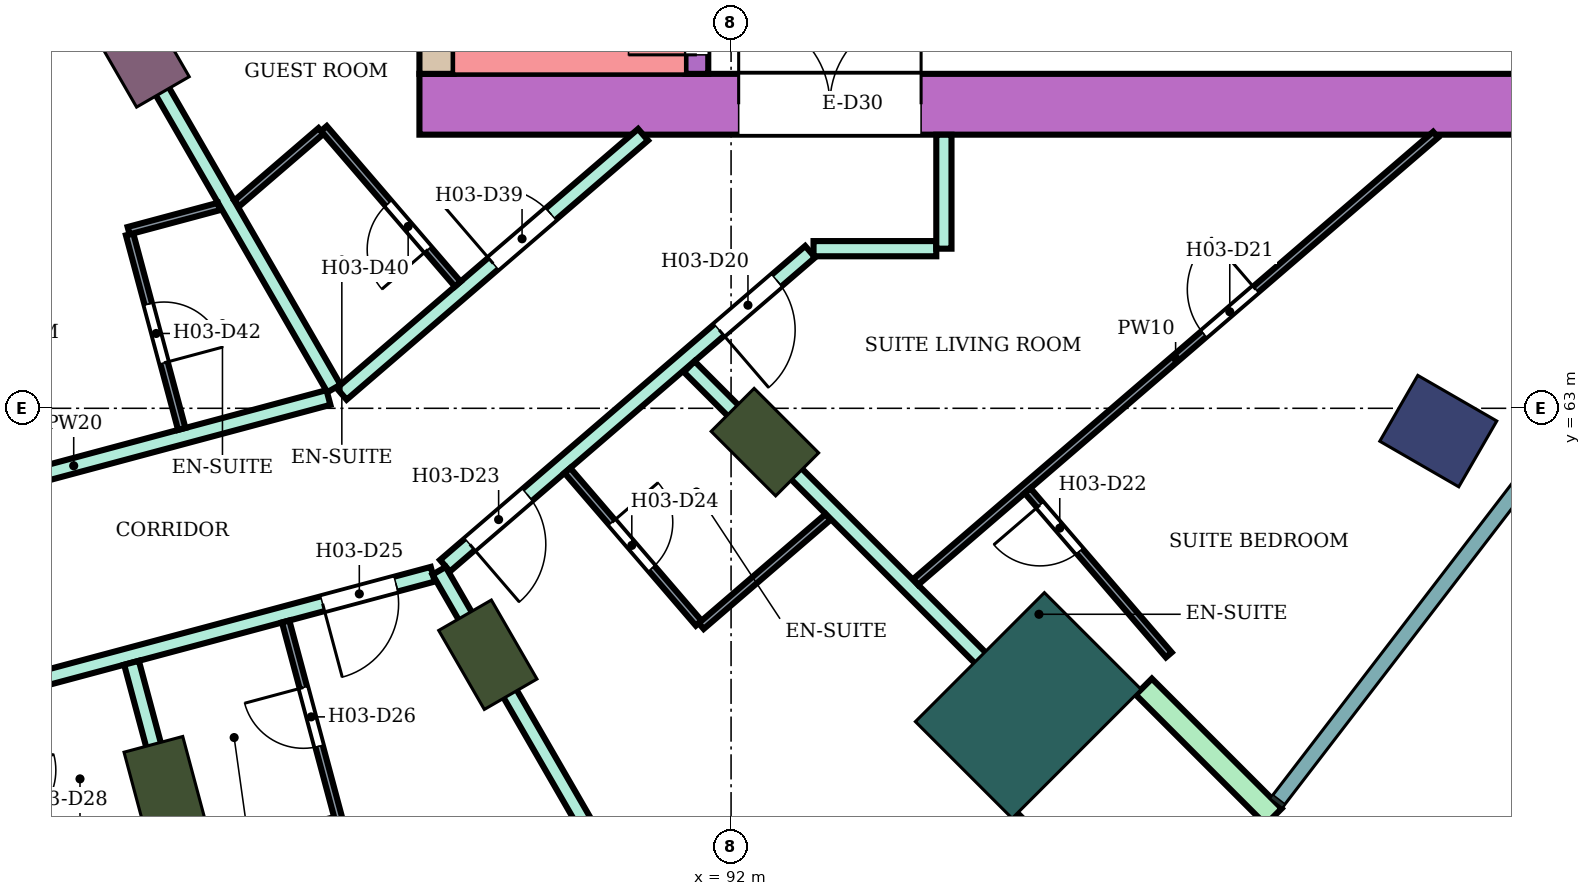
"""IFC4 building model, lengths in metres.
Left out: names, types, materials, properties, quantities, classifications, styles, units other than length and angle.
Written with IfcOpenShell. Run it as: python <this file> out.ifc"""

import sys

from ifc_helpers import new_model, si_unit, direction, frame, frame_2d, origin, origin_2d, place, context, subcontext, project, spatial, rectangle, extrude, element, fill, save


model = new_model("IFC4")
c1 = context("Model", 3, precision=1e-05, world=origin(), true_north=direction((0.0, 1.0)))
c2 = subcontext(c1, "Body", "Model", "MODEL_VIEW")
j1 = project(units=[si_unit("LENGTHUNIT", "METRE"), si_unit("PLANEANGLEUNIT", "RADIAN")], contexts=[c1])
p1 = place(None, origin())
s1 = spatial("IfcSite", under=j1, at=p1, CompositionType="ELEMENT")
p2 = place(p1, origin())
s2 = spatial("IfcBuilding", under=s1, at=p2, CompositionType="ELEMENT")
p3 = place(p2, frame((0.0, 0.0, 55.4)))
s3 = spatial("IfcBuildingStorey", under=s2, at=p3, CompositionType="ELEMENT", Elevation=55.4)
p4 = place(p3, frame((101.304, 62.7, 0.0), z_axis=(0.0, 0.0, 1.0), x_axis=(0.866025403784, -0.5, 0.0)))
e1 = element("IfcColumn", 1, at=p4, inside=s3, PredefinedType="COLUMN", context=c2, shape_type="SweptSolid", body=[
    extrude(rectangle(XDim=1.2, YDim=1.0, at=origin_2d()), origin(), (0.0, 0.0, 1.0), 3.8),
])
for number, where, z_axis, x_axis in (
    (2, (84.555, 58.0, 0.0), (0.0, 0.0, 1.0), (0.259, -0.966, 0.0)),
    (3, (88.8, 59.758, 0.0), (0.0, 0.0, 1.0), (0.5, -0.866, 0.0)),
    (4, (92.445, 62.555, 0.0), (0.0, 0.0, 1.0), (0.707, -0.707, 0.0)),
):
    element("IfcColumn", number, at=place(p3, frame(where, z_axis=z_axis, x_axis=x_axis)), inside=s3, PredefinedType="COLUMN", context=c2, shape_type="SweptSolid", body=[
        extrude(rectangle(XDim=1.2, YDim=0.8, at=origin_2d()), origin(), (0.0, 0.0, 1.0), 3.8),
    ])
p5 = place(p3, frame((84.3, 67.552, 0.0), z_axis=(0.0, 0.0, 1.0), x_axis=(0.5, -0.866025403784, 0.0)))
e5 = element("IfcColumn", 5, at=p5, inside=s3, PredefinedType="COLUMN", context=c2, shape_type="SweptSolid", body=[
    extrude(rectangle(XDim=0.9, YDim=0.8, at=origin_2d()), origin(), (0.0, 0.0, 1.0), 3.8),
])
p6 = place(p3, frame((95.91, 59.09, 0.0), z_axis=(0.0, 0.0, 1.0), x_axis=(0.707106781187, -0.707106781187, 0.0)))
e6 = element("IfcColumn", 6, at=p6, inside=s3, PredefinedType="COLUMN", context=c2, shape_type="SweptSolid", body=[
    extrude(rectangle(XDim=1.8, YDim=2.4, at=origin_2d()), origin(), (0.0, 0.0, 1.0), 3.8),
])
p7 = place(p3, frame((87.9, 67.0, 0.0), z_axis=(0.0, 0.0, 1.0), x_axis=(1.0, 0.0, 0.0)))
e7 = element("IfcWall", 7, at=p7, inside=s3, PredefinedType="SHEAR", context=c2, shape_type="SweptSolid", body=[
    extrude(rectangle(XDim=14.7, YDim=0.8, at=frame_2d((7.35, 0.0))), origin(), (0.0, 0.0, 1.0), 3.48),
])
p8 = place(p7, frame((4.2, 0.0, 0.0)))
e8 = element("IfcOpeningElement", 8, at=p8, cuts=e7, PredefinedType="OPENING", context=c2, shape_type="SweptSolid", body=[
    extrude(rectangle(XDim=2.4, YDim=2.4, at=frame_2d((1.2, 1.2))), frame((0.0, 0.41, 0.0), z_axis=(0.0, -1.0, 0.0), x_axis=(1.0, 0.0, 0.0)), (0.0, 0.0, 1.0), 0.82),
])
p9 = place(p3, frame((88.125, 67.4, 0.0), z_axis=(0.0, 0.0, 1.0), x_axis=(0.0, 1.0, 0.0)))
e9 = element("IfcWall", 9, at=p9, inside=s3, PredefinedType="SHEAR", context=c2, shape_type="SweptSolid", body=[
    extrude(rectangle(XDim=7.6, YDim=0.45, at=frame_2d((3.8, 0.0))), origin(), (0.0, 0.0, 1.0), 3.48),
])
p10 = place(p3, frame((91.55, 67.4, 0.0), z_axis=(0.0, 0.0, 1.0), x_axis=(0.0, 1.0, 0.0)))
e10 = element("IfcWall", 10, at=p10, inside=s3, PredefinedType="SHEAR", context=c2, shape_type="SweptSolid", body=[
    extrude(rectangle(XDim=7.6, YDim=0.3, at=frame_2d((3.8, 0.0))), origin(), (0.0, 0.0, 1.0), 3.48),
])
p11 = place(p10, frame((0.25, 0.0, 0.0)))
e11 = element("IfcOpeningElement", 11, at=p11, cuts=e10, PredefinedType="OPENING", context=c2, shape_type="SweptSolid", body=[
    extrude(rectangle(XDim=0.9, YDim=2.1, at=frame_2d((0.45, 1.05))), frame((0.0, 0.16, 0.0), z_axis=(0.0, -1.0, 0.0), x_axis=(1.0, 0.0, 0.0)), (0.0, 0.0, 1.0), 0.32),
])
for number, where, z_axis, x_axis in (
    (12, (95.662, 57.57, 0.0), (0.0, 0.0, 1.0), (0.707, -0.707, 0.0)),
    (13, (97.43, 59.338, 0.0), (0.0, 0.0, 1.0), (0.707, -0.707, 0.0)),
):
    element("IfcWall", number, at=place(p3, frame(where, z_axis=z_axis, x_axis=x_axis)), inside=s3, PredefinedType="NOTDEFINED", context=c2, shape_type="SweptSolid", body=[
        extrude(rectangle(XDim=2.416, YDim=0.3, at=frame_2d((1.208, 0.0))), origin(), (0.0, 0.0, 1.0), 3.8),
    ])
p12 = place(p3, frame((80.0, 67.396, 0.0), z_axis=(0.0, 0.0, 1.0), x_axis=(0.965933654434, 0.258789828301, 0.0)))
e14 = element("IfcWall", 14, at=p12, inside=s3, PredefinedType="NOTDEFINED", context=c2, shape_type="SweptSolid", body=[
    extrude(rectangle(XDim=3.936, YDim=0.2, at=frame_2d((1.968, 0.0))), origin(), (0.0, 0.0, 1.0), 3.8),
])
p13 = place(p12, frame((0.468, 0.0, 0.9)))
e15 = element("IfcOpeningElement", 15, at=p13, cuts=e14, PredefinedType="OPENING", context=c2, shape_type="SweptSolid", body=[
    extrude(rectangle(XDim=3.0, YDim=2.3, at=frame_2d((1.5, 1.15))), frame((0.0, 0.11, 0.0), z_axis=(0.0, -1.0, 0.0), x_axis=(1.0, 0.0, 0.0)), (0.0, 0.0, 1.0), 0.22),
])
p14 = place(p3, frame((80.0, 58.655, 0.0), z_axis=(0.0, 0.0, 1.0), x_axis=(0.965974635626, 0.258636817424, 0.0)))
e16 = element("IfcWall", 16, at=p14, inside=s3, PredefinedType="PARTITIONING", context=c2, shape_type="SweptSolid", body=[
    extrude(rectangle(XDim=8.36, YDim=0.2, at=frame_2d((4.18, 0.0))), origin(), (0.0, 0.0, 1.0), 3.35),
])
p15 = place(p14, frame((6.86, 0.0, 0.0)))
e17 = element("IfcOpeningElement", 17, at=p15, cuts=e16, PredefinedType="OPENING", context=c2, shape_type="SweptSolid", body=[
    extrude(rectangle(XDim=1.0, YDim=2.1, at=frame_2d((0.5, 1.05))), frame((0.0, 0.11, 0.0), z_axis=(0.0, -1.0, 0.0), x_axis=(1.0, 0.0, 0.0)), (0.0, 0.0, 1.0), 0.22),
])
p16 = place(p14, frame((0.55, 0.0, 0.0)))
e18 = element("IfcOpeningElement", 18, at=p16, cuts=e16, PredefinedType="OPENING", context=c2, shape_type="SweptSolid", body=[
    extrude(rectangle(XDim=1.0, YDim=2.1, at=frame_2d((0.5, 1.05))), frame((0.0, 0.11, 0.0), z_axis=(0.0, -1.0, 0.0), x_axis=(1.0, 0.0, 0.0)), (0.0, 0.0, 1.0), 0.22),
])
p17 = place(p3, frame((80.0, 61.346, 0.0), z_axis=(0.0, 0.0, 1.0), x_axis=(0.965924181808, 0.258825182312, 0.0)))
e19 = element("IfcWall", 19, at=p17, inside=s3, PredefinedType="PARTITIONING", context=c2, shape_type="SweptSolid", body=[
    extrude(rectangle(XDim=6.94, YDim=0.2, at=frame_2d((3.47, 0.0))), origin(), (0.0, 0.0, 1.0), 3.35),
])
p18 = place(p17, frame((0.55, 0.0, 0.0)))
e20 = element("IfcOpeningElement", 20, at=p18, cuts=e19, PredefinedType="OPENING", context=c2, shape_type="SweptSolid", body=[
    extrude(rectangle(XDim=1.0, YDim=2.1, at=frame_2d((0.5, 1.05))), frame((0.0, 0.11, 0.0), z_axis=(0.0, -1.0, 0.0), x_axis=(1.0, 0.0, 0.0)), (0.0, 0.0, 1.0), 0.22),
])
p19 = place(p3, frame((83.848, 68.332, 0.0), z_axis=(0.0, 0.0, 1.0), x_axis=(0.499901724708, -0.866082135617, 0.0)))
e21 = element("IfcWall", 21, at=p19, inside=s3, PredefinedType="PARTITIONING", context=c2, shape_type="SweptSolid", body=[
    extrude(rectangle(XDim=5.855, YDim=0.2, at=frame_2d((2.928, 0.0))), origin(), (0.0, 0.0, 1.0), 3.35),
])
p20 = place(p3, frame((84.112, 59.652, 0.0), z_axis=(0.0, 0.0, 1.0), x_axis=(0.258843225553, -0.965919346832, 0.0)))
e22 = element("IfcWall", 22, at=p20, inside=s3, PredefinedType="PARTITIONING", context=c2, shape_type="SweptSolid", body=[
    extrude(rectangle(XDim=9.909, YDim=0.2, at=frame_2d((4.955, 0.0))), origin(), (0.0, 0.0, 1.0), 3.35),
])
p21 = place(p3, frame((86.877, 63.189, 0.0), z_axis=(0.0, 0.0, 1.0), x_axis=(0.758164888471, 0.652062881853, 0.0)))
e23 = element("IfcWall", 23, at=p21, inside=s3, PredefinedType="PARTITIONING", context=c2, shape_type="SweptSolid", body=[
    extrude(rectangle(XDim=5.23, YDim=0.2, at=frame_2d((2.615, 0.0))), origin(), (0.0, 0.0, 1.0), 3.35),
])
p22 = place(p21, frame((2.63, 0.0, 0.0)))
e24 = element("IfcOpeningElement", 24, at=p22, cuts=e23, PredefinedType="OPENING", context=c2, shape_type="SweptSolid", body=[
    extrude(rectangle(XDim=1.0, YDim=2.1, at=frame_2d((0.5, 1.05))), frame((0.0, 0.11, 0.0), z_axis=(0.0, -1.0, 0.0), x_axis=(1.0, 0.0, 0.0)), (0.0, 0.0, 1.0), 0.22),
])
p23 = place(p3, frame((88.236, 60.929, 0.0), z_axis=(0.0, 0.0, 1.0), x_axis=(0.758227485202, 0.651990092474, 0.0)))
e25 = element("IfcWall", 25, at=p23, inside=s3, PredefinedType="PARTITIONING", context=c2, shape_type="SweptSolid", body=[
    extrude(rectangle(XDim=6.336, YDim=0.2, at=frame_2d((3.168, 0.0))), origin(), (0.0, 0.0, 1.0), 3.35),
])
p24 = place(p23, frame((4.757, 0.0, 0.0)))
e26 = element("IfcOpeningElement", 26, at=p24, cuts=e25, PredefinedType="OPENING", context=c2, shape_type="SweptSolid", body=[
    extrude(rectangle(XDim=1.0, YDim=2.1, at=frame_2d((0.5, 1.05))), frame((0.0, 0.11, 0.0), z_axis=(0.0, -1.0, 0.0), x_axis=(1.0, 0.0, 0.0)), (0.0, 0.0, 1.0), 0.22),
])
p25 = place(p23, frame((0.43, 0.0, 0.0)))
e27 = element("IfcOpeningElement", 27, at=p25, cuts=e25, PredefinedType="OPENING", context=c2, shape_type="SweptSolid", body=[
    extrude(rectangle(XDim=1.0, YDim=2.1, at=frame_2d((0.5, 1.05))), frame((0.0, 0.11, 0.0), z_axis=(0.0, -1.0, 0.0), x_axis=(1.0, 0.0, 0.0)), (0.0, 0.0, 1.0), 0.22),
])
p26 = place(p3, frame((88.159, 60.863, 0.0), z_axis=(0.0, 0.0, 1.0), x_axis=(0.499886028459, -0.866091195286, 0.0)))
e28 = element("IfcWall", 28, at=p26, inside=s3, PredefinedType="PARTITIONING", context=c2, shape_type="SweptSolid", body=[
    extrude(rectangle(XDim=9.475, YDim=0.2, at=frame_2d((4.737, 0.0))), origin(), (0.0, 0.0, 1.0), 3.35),
])
p27 = place(p3, frame((91.449, 63.548, 0.0), z_axis=(0.0, 0.0, 1.0), x_axis=(0.706984810649, -0.707228730688, 0.0)))
e29 = element("IfcWall", 29, at=p27, inside=s3, PredefinedType="PARTITIONING", context=c2, shape_type="SweptSolid", body=[
    extrude(rectangle(XDim=7.006, YDim=0.2, at=frame_2d((3.503, 0.0))), origin(), (0.0, 0.0, 1.0), 3.35),
])
p28 = place(p3, frame((93.085, 65.1, 0.0), z_axis=(0.0, 0.0, 1.0), x_axis=(1.0, 0.0, 0.0)))
e30 = element("IfcWall", 30, at=p28, inside=s3, PredefinedType="PARTITIONING", context=c2, shape_type="SweptSolid", body=[
    extrude(rectangle(XDim=1.615, YDim=0.2, at=frame_2d((0.808, 0.0))), origin(), (0.0, 0.0, 1.0), 3.35),
])
p29 = place(p3, frame((94.8, 65.1, 0.0), z_axis=(0.0, 0.0, 1.0), x_axis=(0.0, 1.0, 0.0)))
e31 = element("IfcWall", 31, at=p29, inside=s3, PredefinedType="PARTITIONING", context=c2, shape_type="SweptSolid", body=[
    extrude(rectangle(XDim=1.499, YDim=0.2, at=frame_2d((0.75, 0.0))), origin(), (0.0, 0.0, 1.0), 3.35),
])
p30 = place(p3, frame((84.087, 65.289, 0.0), z_axis=(0.0, 0.0, 1.0), x_axis=(0.258929459649, -0.965896234037, 0.0)))
e32 = element("IfcWall", 32, at=p30, inside=s3, PredefinedType="PARTITIONING", context=c2, shape_type="SweptSolid", body=[
    extrude(rectangle(XDim=2.65, YDim=0.1, at=frame_2d((1.325, 0.0))), origin(), (0.0, 0.0, 1.0), 3.35),
])
p31 = place(p30, frame((0.95, 0.0, 0.0)))
e33 = element("IfcOpeningElement", 33, at=p31, cuts=e32, PredefinedType="OPENING", context=c2, shape_type="SweptSolid", body=[
    extrude(rectangle(XDim=0.8, YDim=2.1, at=frame_2d((0.4, 1.05))), frame((0.0, 0.06, 0.0), z_axis=(0.0, -1.0, 0.0), x_axis=(1.0, 0.0, 0.0)), (0.0, 0.0, 1.0), 0.12),
])
p32 = place(p3, frame((84.074, 65.337, 0.0), z_axis=(0.0, 0.0, 1.0), x_axis=(0.965914351064, 0.258861867428, 0.0)))
e34 = element("IfcWall", 34, at=p32, inside=s3, PredefinedType="PARTITIONING", context=c2, shape_type="SweptSolid", body=[
    extrude(rectangle(XDim=1.229, YDim=0.1, at=frame_2d((0.615, 0.0))), origin(), (0.0, 0.0, 1.0), 3.35),
])
p33 = place(p3, frame((85.497, 65.696, 0.0), z_axis=(0.0, 0.0, 1.0), x_axis=(0.75817032582, 0.652056559698, 0.0)))
e35 = element("IfcWall", 35, at=p33, inside=s3, PredefinedType="PARTITIONING", context=c2, shape_type="SweptSolid", body=[
    extrude(rectangle(XDim=1.461, YDim=0.1, at=frame_2d((0.73, 0.0))), origin(), (0.0, 0.0, 1.0), 3.35),
])
p34 = place(p3, frame((86.14, 60.196, 0.0), z_axis=(0.0, 0.0, 1.0), x_axis=(0.258945475746, -0.965891940432, 0.0)))
e36 = element("IfcWall", 36, at=p34, inside=s3, PredefinedType="PARTITIONING", context=c2, shape_type="SweptSolid", body=[
    extrude(rectangle(XDim=2.7, YDim=0.1, at=frame_2d((1.35, 0.0))), origin(), (0.0, 0.0, 1.0), 3.35),
])
p35 = place(p34, frame((0.9, 0.0, 0.0)))
e37 = element("IfcOpeningElement", 37, at=p35, cuts=e36, PredefinedType="OPENING", context=c2, shape_type="SweptSolid", body=[
    extrude(rectangle(XDim=0.8, YDim=2.1, at=frame_2d((0.4, 1.05))), frame((0.0, 0.06, 0.0), z_axis=(0.0, -1.0, 0.0), x_axis=(1.0, 0.0, 0.0)), (0.0, 0.0, 1.0), 0.12),
])
p36 = place(p3, frame((86.643, 66.681, 0.0), z_axis=(0.0, 0.0, 1.0), x_axis=(0.652264876065, -0.757991115682, 0.0)))
e38 = element("IfcWall", 38, at=p36, inside=s3, PredefinedType="PARTITIONING", context=c2, shape_type="SweptSolid", body=[
    extrude(rectangle(XDim=2.699, YDim=0.1, at=frame_2d((1.35, 0.0))), origin(), (0.0, 0.0, 1.0), 3.35),
])
p37 = place(p36, frame((1.3, 0.0, 0.0)))
e39 = element("IfcOpeningElement", 39, at=p37, cuts=e38, PredefinedType="OPENING", context=c2, shape_type="SweptSolid", body=[
    extrude(rectangle(XDim=0.8, YDim=2.1, at=frame_2d((0.4, 1.05))), frame((0.0, 0.06, 0.0), z_axis=(0.0, -1.0, 0.0), x_axis=(1.0, 0.0, 0.0)), (0.0, 0.0, 1.0), 0.12),
])
p38 = place(p3, frame((89.846, 62.182, 0.0), z_axis=(0.0, 0.0, 1.0), x_axis=(0.652095405055, -0.758136915541, 0.0)))
e40 = element("IfcWall", 40, at=p38, inside=s3, PredefinedType="PARTITIONING", context=c2, shape_type="SweptSolid", body=[
    extrude(rectangle(XDim=2.65, YDim=0.1, at=frame_2d((1.325, 0.0))), origin(), (0.0, 0.0, 1.0), 3.35),
])
p39 = place(p38, frame((0.9, 0.0, 0.0)))
e41 = element("IfcOpeningElement", 41, at=p39, cuts=e40, PredefinedType="OPENING", context=c2, shape_type="SweptSolid", body=[
    extrude(rectangle(XDim=0.8, YDim=2.1, at=frame_2d((0.4, 1.05))), frame((0.0, 0.06, 0.0), z_axis=(0.0, -1.0, 0.0), x_axis=(1.0, 0.0, 0.0)), (0.0, 0.0, 1.0), 0.12),
])
p40 = place(p3, frame((91.607, 60.135, 0.0), z_axis=(0.0, 0.0, 1.0), x_axis=(0.758135842672, 0.652096652388, 0.0)))
e42 = element("IfcWall", 42, at=p40, inside=s3, PredefinedType="PARTITIONING", context=c2, shape_type="SweptSolid", body=[
    extrude(rectangle(XDim=2.201, YDim=0.1, at=frame_2d((1.101, 0.0))), origin(), (0.0, 0.0, 1.0), 3.35),
])
p41 = place(p3, frame((94.428, 60.715, 0.0), z_axis=(0.0, 0.0, 1.0), x_axis=(0.758117248367, 0.65211826974, 0.0)))
e43 = element("IfcWall", 43, at=p41, inside=s3, PredefinedType="PARTITIONING", context=c2, shape_type="SweptSolid", body=[
    extrude(rectangle(XDim=9.024, YDim=0.1, at=frame_2d((4.512, 0.0))), origin(), (0.0, 0.0, 1.0), 3.35),
])
p42 = place(p41, frame((5.002, 0.0, 0.0)))
e44 = element("IfcOpeningElement", 44, at=p42, cuts=e43, PredefinedType="OPENING", context=c2, shape_type="SweptSolid", body=[
    extrude(rectangle(XDim=0.9, YDim=2.1, at=frame_2d((0.45, 1.05))), frame((0.0, 0.06, 0.0), z_axis=(0.0, -1.0, 0.0), x_axis=(1.0, 0.0, 0.0)), (0.0, 0.0, 1.0), 0.12),
])
p43 = place(p3, frame((95.901, 61.916, 0.0), z_axis=(0.0, 0.0, 1.0), x_axis=(0.652215581117, -0.758033532074, 0.0)))
e45 = element("IfcWall", 45, at=p43, inside=s3, PredefinedType="PARTITIONING", context=c2, shape_type="SweptSolid", body=[
    extrude(rectangle(XDim=2.849, YDim=0.1, at=frame_2d((1.425, 0.0))), origin(), (0.0, 0.0, 1.0), 3.35),
])
p44 = place(p43, frame((0.25, 0.0, 0.0)))
e46 = element("IfcOpeningElement", 46, at=p44, cuts=e45, PredefinedType="OPENING", context=c2, shape_type="SweptSolid", body=[
    extrude(rectangle(XDim=0.8, YDim=2.1, at=frame_2d((0.4, 1.05))), frame((0.0, 0.06, 0.0), z_axis=(0.0, -1.0, 0.0), x_axis=(1.0, 0.0, 0.0)), (0.0, 0.0, 1.0), 0.12),
])
p45 = place(p13, origin())
e47 = element("IfcWindow", 47, at=p45, inside=s3, PartitioningType="SINGLE_PANEL", PredefinedType="WINDOW", context=c2, shape_type="SweptSolid", body=[
    extrude(rectangle(XDim=3.0, YDim=2.3, at=frame_2d((1.5, 1.15))), frame((0.0, 0.03, 0.0), z_axis=(0.0, -1.0, 0.0), x_axis=(1.0, 0.0, 0.0)), (0.0, 0.0, 1.0), 0.06),
])
fill(e15, e47)
p46 = place(p24, frame((1.0, 0.0, 0.0), z_axis=(0.0, 0.0, 1.0), x_axis=(-1.0, 0.0, 0.0)))
e48 = element("IfcDoor", 48, at=p46, inside=s3, OperationType="SINGLE_SWING_RIGHT", PredefinedType="DOOR", context=c2, shape_type="SweptSolid", body=[
    extrude(rectangle(XDim=1.0, YDim=2.1, at=frame_2d((0.5, 1.05))), frame((0.0, 0.025, 0.0), z_axis=(0.0, -1.0, 0.0), x_axis=(1.0, 0.0, 0.0)), (0.0, 0.0, 1.0), 0.05),
])
fill(e26, e48)
p47 = place(p42, origin())
e49 = element("IfcDoor", 49, at=p47, inside=s3, OperationType="SINGLE_SWING_RIGHT", PredefinedType="DOOR", context=c2, shape_type="SweptSolid", body=[
    extrude(rectangle(XDim=0.9, YDim=2.1, at=frame_2d((0.45, 1.05))), frame((0.0, 0.025, 0.0), z_axis=(0.0, -1.0, 0.0), x_axis=(1.0, 0.0, 0.0)), (0.0, 0.0, 1.0), 0.05),
])
fill(e44, e49)
p48 = place(p44, frame((0.8, 0.0, 0.0), z_axis=(0.0, 0.0, 1.0), x_axis=(-1.0, 0.0, 0.0)))
e50 = element("IfcDoor", 50, at=p48, inside=s3, OperationType="SINGLE_SWING_RIGHT", PredefinedType="DOOR", context=c2, shape_type="SweptSolid", body=[
    extrude(rectangle(XDim=0.8, YDim=2.1, at=frame_2d((0.4, 1.05))), frame((0.0, 0.025, 0.0), z_axis=(0.0, -1.0, 0.0), x_axis=(1.0, 0.0, 0.0)), (0.0, 0.0, 1.0), 0.05),
])
fill(e46, e50)
p49 = place(p25, frame((1.0, 0.0, 0.0), z_axis=(0.0, 0.0, 1.0), x_axis=(-1.0, 0.0, 0.0)))
e51 = element("IfcDoor", 51, at=p49, inside=s3, OperationType="SINGLE_SWING_RIGHT", PredefinedType="DOOR", context=c2, shape_type="SweptSolid", body=[
    extrude(rectangle(XDim=1.0, YDim=2.1, at=frame_2d((0.5, 1.05))), frame((0.0, 0.025, 0.0), z_axis=(0.0, -1.0, 0.0), x_axis=(1.0, 0.0, 0.0)), (0.0, 0.0, 1.0), 0.05),
])
fill(e27, e51)
p50 = place(p39, origin())
e52 = element("IfcDoor", 52, at=p50, inside=s3, OperationType="SINGLE_SWING_LEFT", PredefinedType="DOOR", context=c2, shape_type="SweptSolid", body=[
    extrude(rectangle(XDim=0.8, YDim=2.1, at=frame_2d((0.4, 1.05))), frame((0.0, 0.025, 0.0), z_axis=(0.0, -1.0, 0.0), x_axis=(1.0, 0.0, 0.0)), (0.0, 0.0, 1.0), 0.05),
])
fill(e41, e52)
p51 = place(p15, frame((1.0, 0.0, 0.0), z_axis=(0.0, 0.0, 1.0), x_axis=(-1.0, 0.0, 0.0)))
e53 = element("IfcDoor", 53, at=p51, inside=s3, OperationType="SINGLE_SWING_RIGHT", PredefinedType="DOOR", context=c2, shape_type="SweptSolid", body=[
    extrude(rectangle(XDim=1.0, YDim=2.1, at=frame_2d((0.5, 1.05))), frame((0.0, 0.025, 0.0), z_axis=(0.0, -1.0, 0.0), x_axis=(1.0, 0.0, 0.0)), (0.0, 0.0, 1.0), 0.05),
])
fill(e17, e53)
p52 = place(p35, frame((0.8, 0.0, 0.0), z_axis=(0.0, 0.0, 1.0), x_axis=(-1.0, 0.0, 0.0)))
e54 = element("IfcDoor", 54, at=p52, inside=s3, OperationType="SINGLE_SWING_RIGHT", PredefinedType="DOOR", context=c2, shape_type="SweptSolid", body=[
    extrude(rectangle(XDim=0.8, YDim=2.1, at=frame_2d((0.4, 1.05))), frame((0.0, 0.025, 0.0), z_axis=(0.0, -1.0, 0.0), x_axis=(1.0, 0.0, 0.0)), (0.0, 0.0, 1.0), 0.05),
])
fill(e37, e54)
p53 = place(p22, origin())
e55 = element("IfcDoor", 55, at=p53, inside=s3, OperationType="SINGLE_SWING_LEFT", PredefinedType="DOOR", context=c2, shape_type="SweptSolid", body=[
    extrude(rectangle(XDim=1.0, YDim=2.1, at=frame_2d((0.5, 1.05))), frame((0.0, 0.025, 0.0), z_axis=(0.0, -1.0, 0.0), x_axis=(1.0, 0.0, 0.0)), (0.0, 0.0, 1.0), 0.05),
])
fill(e24, e55)
p54 = place(p37, frame((0.8, 0.0, 0.0), z_axis=(0.0, 0.0, 1.0), x_axis=(-1.0, 0.0, 0.0)))
e56 = element("IfcDoor", 56, at=p54, inside=s3, OperationType="SINGLE_SWING_LEFT", PredefinedType="DOOR", context=c2, shape_type="SweptSolid", body=[
    extrude(rectangle(XDim=0.8, YDim=2.1, at=frame_2d((0.4, 1.05))), frame((0.0, 0.025, 0.0), z_axis=(0.0, -1.0, 0.0), x_axis=(1.0, 0.0, 0.0)), (0.0, 0.0, 1.0), 0.05),
])
fill(e39, e56)
p55 = place(p31, origin())
e57 = element("IfcDoor", 57, at=p55, inside=s3, OperationType="SINGLE_SWING_RIGHT", PredefinedType="DOOR", context=c2, shape_type="SweptSolid", body=[
    extrude(rectangle(XDim=0.8, YDim=2.1, at=frame_2d((0.4, 1.05))), frame((0.0, 0.025, 0.0), z_axis=(0.0, -1.0, 0.0), x_axis=(1.0, 0.0, 0.0)), (0.0, 0.0, 1.0), 0.05),
])
fill(e33, e57)
p56 = place(p11, origin())
e58 = element("IfcDoor", 58, at=p56, inside=s3, OperationType="SINGLE_SWING_LEFT", PredefinedType="DOOR", context=c2, shape_type="SweptSolid", body=[
    extrude(rectangle(XDim=0.9, YDim=2.1, at=frame_2d((0.45, 1.05))), frame((0.0, 0.025, 0.0), z_axis=(0.0, -1.0, 0.0), x_axis=(1.0, 0.0, 0.0)), (0.0, 0.0, 1.0), 0.05),
])
fill(e11, e58)
p57 = place(p8, origin())
e59 = element("IfcDoor", 59, at=p57, inside=s3, OperationType="DOUBLE_DOOR_SINGLE_SWING", PredefinedType="DOOR", context=c2, shape_type="SweptSolid", body=[
    extrude(rectangle(XDim=2.4, YDim=2.4, at=frame_2d((1.2, 1.2))), frame((0.0, 0.025, 0.0), z_axis=(0.0, -1.0, 0.0), x_axis=(1.0, 0.0, 0.0)), (0.0, 0.0, 1.0), 0.05),
])
fill(e8, e59)
save(model, sys.argv[1])
